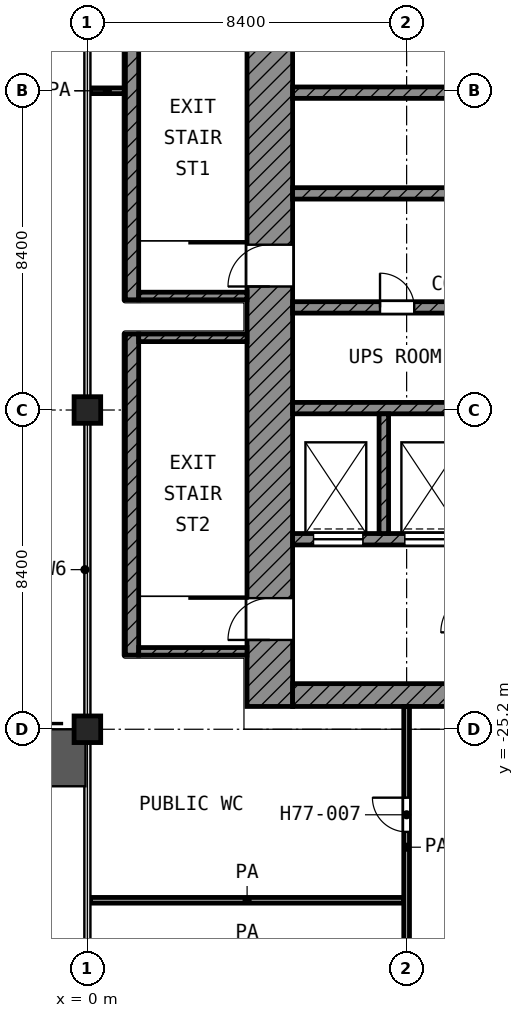
"""IFC4 building model, lengths in metres.
Left out: names, types, materials, properties, quantities, classifications, styles, units other than length and angle.
Written with IfcOpenShell. Run it as: python <this file> out.ifc"""

import sys

from ifc_helpers import new_model, si_unit, direction, frame, frame_2d, origin, origin_2d, place, context, subcontext, project, spatial, rectangle, extrude, element, fill, save


model = new_model("IFC4")
c1 = context("Model", 3, precision=1e-05, world=origin(), true_north=direction((0.0, 1.0)))
c2 = subcontext(c1, "Body", "Model", "MODEL_VIEW")
j1 = project(units=[si_unit("LENGTHUNIT", "METRE"), si_unit("PLANEANGLEUNIT", "RADIAN")], contexts=[c1])
p1 = place(None, origin())
s1 = spatial("IfcSite", under=j1, at=p1, CompositionType="ELEMENT")
p2 = place(p1, origin())
s2 = spatial("IfcBuilding", under=s1, at=p2, CompositionType="ELEMENT")
p3 = place(p2, frame((0.0, 0.0, 332.2)))
s3 = spatial("IfcBuildingStorey", under=s2, at=p3, CompositionType="ELEMENT", Elevation=332.2)
for number, where, z_axis, x_axis in (
    (1, (0.0, -16.8, 0.0), (0.0, 0.0, 1.0), (1.0, 0.0, 0.0)),
    (2, (0.0, -25.2, 0.0), (0.0, 0.0, 1.0), (1.0, 0.0, 0.0)),
):
    element("IfcColumn", number, at=place(p3, frame(where, z_axis=z_axis, x_axis=x_axis)), inside=s3, PredefinedType="COLUMN", context=c2, shape_type="SweptSolid", body=[
        extrude(rectangle(XDim=0.7, YDim=0.7, at=origin_2d()), origin(), (0.0, 0.0, 1.0), 4.5),
    ])
p4 = place(p3, frame((0.125, -30.827, 4.5), z_axis=(0.0, 0.0, 1.0), x_axis=(0.0, 1.0, 0.0)))
e3 = element("IfcWall", 3, at=p4, inside=s3, PredefinedType="SOLIDWALL", context=c2, shape_type="SweptSolid", body=[
    extrude(rectangle(XDim=5.452, YDim=0.25, at=frame_2d((2.726, 0.0))), origin(), (0.0, 0.0, 1.0), 1.1),
])
p5 = place(p3, frame((-0.132, -25.05, 4.5), z_axis=(0.0, 0.0, 1.0), x_axis=(-1.0, 0.0, 0.0)))
e4 = element("IfcWall", 4, at=p5, inside=s3, PredefinedType="SOLIDWALL", context=c2, shape_type="SweptSolid", body=[
    extrude(rectangle(XDim=0.551, YDim=0.25, at=frame_2d((0.275, 0.0))), origin(), (0.0, 0.0, 1.0), 1.1),
])
p6 = place(p3, frame((4.8, -24.6, 0.0), z_axis=(0.0, 0.0, 1.0), x_axis=(0.0, 1.0, 0.0)))
e5 = element("IfcWall", 5, at=p6, inside=s3, PredefinedType="SHEAR", context=c2, shape_type="SweptSolid", body=[
    extrude(rectangle(XDim=19.2, YDim=1.2, at=frame_2d((9.6, 0.0))), origin(), (0.0, 0.0, 1.0), 3.95),
])
p7 = place(p6, frame((11.05, 0.0, 0.0)))
e6 = element("IfcOpeningElement", 6, at=p7, cuts=e5, PredefinedType="OPENING", context=c2, shape_type="SweptSolid", body=[
    extrude(rectangle(XDim=1.1, YDim=2.1, at=frame_2d((0.55, 1.05))), frame((0.0, 0.61, 0.0), z_axis=(0.0, -1.0, 0.0), x_axis=(1.0, 0.0, 0.0)), (0.0, 0.0, 1.0), 1.22),
])
p8 = place(p6, frame((1.75, 0.0, 0.0)))
e7 = element("IfcOpeningElement", 7, at=p8, cuts=e5, PredefinedType="OPENING", context=c2, shape_type="SweptSolid", body=[
    extrude(rectangle(XDim=1.1, YDim=2.1, at=frame_2d((0.55, 1.05))), frame((0.0, 0.61, 0.0), z_axis=(0.0, -1.0, 0.0), x_axis=(1.0, 0.0, 0.0)), (0.0, 0.0, 1.0), 1.22),
])
p9 = place(p3, frame((5.4, -24.3, 0.0), z_axis=(0.0, 0.0, 1.0), x_axis=(1.0, 0.0, 0.0)))
e8 = element("IfcWall", 8, at=p9, inside=s3, PredefinedType="SHEAR", context=c2, shape_type="SweptSolid", body=[
    extrude(rectangle(XDim=18.6, YDim=0.6, at=frame_2d((9.3, 0.0))), origin(), (0.0, 0.0, 1.0), 3.95),
])
p10 = place(p9, frame((6.3, 0.0, 0.0)))
e9 = element("IfcOpeningElement", 9, at=p10, cuts=e8, PredefinedType="OPENING", context=c2, shape_type="SweptSolid", body=[
    extrude(rectangle(XDim=1.8, YDim=2.1, at=frame_2d((0.9, 1.05))), frame((0.0, 0.31, 0.0), z_axis=(0.0, -1.0, 0.0), x_axis=(1.0, 0.0, 0.0)), (0.0, 0.0, 1.0), 0.62),
])
p11 = place(p3, frame((5.4, -8.45, 0.0), z_axis=(0.0, 0.0, 1.0), x_axis=(1.0, 0.0, 0.0)))
e10 = element("IfcWall", 10, at=p11, inside=s3, PredefinedType="SHEAR", context=c2, shape_type="SweptSolid", body=[
    extrude(rectangle(XDim=16.65, YDim=0.3, at=frame_2d((8.325, 0.0))), origin(), (0.0, 0.0, 1.0), 3.95),
])
p12 = place(p3, frame((5.4, -11.1, 0.0), z_axis=(0.0, 0.0, 1.0), x_axis=(1.0, 0.0, 0.0)))
e11 = element("IfcWall", 11, at=p12, inside=s3, PredefinedType="SHEAR", context=c2, shape_type="SweptSolid", body=[
    extrude(rectangle(XDim=16.65, YDim=0.3, at=frame_2d((8.325, 0.0))), origin(), (0.0, 0.0, 1.0), 3.95),
])
p13 = place(p12, frame((7.8, 0.0, 0.0)))
e12 = element("IfcOpeningElement", 12, at=p13, cuts=e11, PredefinedType="OPENING", context=c2, shape_type="SweptSolid", body=[
    extrude(rectangle(XDim=0.9, YDim=2.1, at=frame_2d((0.45, 1.05))), frame((0.0, 0.16, 0.0), z_axis=(0.0, -1.0, 0.0), x_axis=(1.0, 0.0, 0.0)), (0.0, 0.0, 1.0), 0.32),
])
p14 = place(p3, frame((5.4, -14.1, 0.0), z_axis=(0.0, 0.0, 1.0), x_axis=(1.0, 0.0, 0.0)))
e13 = element("IfcWall", 13, at=p14, inside=s3, PredefinedType="SHEAR", context=c2, shape_type="SweptSolid", body=[
    extrude(rectangle(XDim=16.65, YDim=0.3, at=frame_2d((8.325, 0.0))), origin(), (0.0, 0.0, 1.0), 3.95),
])
p15 = place(p14, frame((6.325, 0.0, 0.0)))
e14 = element("IfcOpeningElement", 14, at=p15, cuts=e13, PredefinedType="OPENING", context=c2, shape_type="SweptSolid", body=[
    extrude(rectangle(XDim=1.1, YDim=2.1, at=frame_2d((0.55, 1.05))), frame((0.0, 0.16, 0.0), z_axis=(0.0, -1.0, 0.0), x_axis=(1.0, 0.0, 0.0)), (0.0, 0.0, 1.0), 0.32),
])
p16 = place(p14, frame((9.075, 0.0, 0.0)))
e15 = element("IfcOpeningElement", 15, at=p16, cuts=e13, PredefinedType="OPENING", context=c2, shape_type="SweptSolid", body=[
    extrude(rectangle(XDim=1.1, YDim=2.1, at=frame_2d((0.55, 1.05))), frame((0.0, 0.16, 0.0), z_axis=(0.0, -1.0, 0.0), x_axis=(1.0, 0.0, 0.0)), (0.0, 0.0, 1.0), 0.32),
])
p17 = place(p14, frame((11.825, 0.0, 0.0)))
e16 = element("IfcOpeningElement", 16, at=p17, cuts=e13, PredefinedType="OPENING", context=c2, shape_type="SweptSolid", body=[
    extrude(rectangle(XDim=1.1, YDim=2.1, at=frame_2d((0.55, 1.05))), frame((0.0, 0.16, 0.0), z_axis=(0.0, -1.0, 0.0), x_axis=(1.0, 0.0, 0.0)), (0.0, 0.0, 1.0), 0.32),
])
p18 = place(p14, frame((14.575, 0.0, 0.0)))
e17 = element("IfcOpeningElement", 17, at=p18, cuts=e13, PredefinedType="OPENING", context=c2, shape_type="SweptSolid", body=[
    extrude(rectangle(XDim=1.1, YDim=2.1, at=frame_2d((0.55, 1.05))), frame((0.0, 0.16, 0.0), z_axis=(0.0, -1.0, 0.0), x_axis=(1.0, 0.0, 0.0)), (0.0, 0.0, 1.0), 0.32),
])
p19 = place(p14, frame((2.3, 0.0, 0.0)))
e18 = element("IfcOpeningElement", 18, at=p19, cuts=e13, PredefinedType="OPENING", context=c2, shape_type="SweptSolid", body=[
    extrude(rectangle(XDim=0.9, YDim=2.1, at=frame_2d((0.45, 1.05))), frame((0.0, 0.16, 0.0), z_axis=(0.0, -1.0, 0.0), x_axis=(1.0, 0.0, 0.0)), (0.0, 0.0, 1.0), 0.32),
])
p20 = place(p3, frame((5.4, -16.75, 0.0), z_axis=(0.0, 0.0, 1.0), x_axis=(1.0, 0.0, 0.0)))
e19 = element("IfcWall", 19, at=p20, inside=s3, PredefinedType="SHEAR", context=c2, shape_type="SweptSolid", body=[
    extrude(rectangle(XDim=16.65, YDim=0.3, at=frame_2d((8.325, 0.0))), origin(), (0.0, 0.0, 1.0), 3.95),
])
p21 = place(p3, frame((5.4, -20.2, 0.0), z_axis=(0.0, 0.0, 1.0), x_axis=(1.0, 0.0, 0.0)))
e20 = element("IfcWall", 20, at=p21, inside=s3, PredefinedType="SHEAR", context=c2, shape_type="SweptSolid", body=[
    extrude(rectangle(XDim=14.65, YDim=0.3, at=frame_2d((7.325, 0.0))), origin(), (0.0, 0.0, 1.0), 3.95),
])
p22 = place(p21, frame((10.55, 0.0, 0.0)))
e21 = element("IfcOpeningElement", 21, at=p22, cuts=e20, PredefinedType="OPENING", context=c2, shape_type="SweptSolid", body=[
    extrude(rectangle(XDim=1.3, YDim=2.1, at=frame_2d((0.65, 1.05))), frame((0.0, 0.16, 0.0), z_axis=(0.0, -1.0, 0.0), x_axis=(1.0, 0.0, 0.0)), (0.0, 0.0, 1.0), 0.32),
])
p23 = place(p21, frame((12.95, 0.0, 0.0)))
e22 = element("IfcOpeningElement", 22, at=p23, cuts=e20, PredefinedType="OPENING", context=c2, shape_type="SweptSolid", body=[
    extrude(rectangle(XDim=1.3, YDim=2.1, at=frame_2d((0.65, 1.05))), frame((0.0, 0.16, 0.0), z_axis=(0.0, -1.0, 0.0), x_axis=(1.0, 0.0, 0.0)), (0.0, 0.0, 1.0), 0.32),
])
p24 = place(p21, frame((0.55, 0.0, 0.0)))
e23 = element("IfcOpeningElement", 23, at=p24, cuts=e20, PredefinedType="OPENING", context=c2, shape_type="SweptSolid", body=[
    extrude(rectangle(XDim=1.3, YDim=2.1, at=frame_2d((0.65, 1.05))), frame((0.0, 0.16, 0.0), z_axis=(0.0, -1.0, 0.0), x_axis=(1.0, 0.0, 0.0)), (0.0, 0.0, 1.0), 0.32),
])
p25 = place(p21, frame((2.95, 0.0, 0.0)))
e24 = element("IfcOpeningElement", 24, at=p25, cuts=e20, PredefinedType="OPENING", context=c2, shape_type="SweptSolid", body=[
    extrude(rectangle(XDim=1.3, YDim=2.1, at=frame_2d((0.65, 1.05))), frame((0.0, 0.16, 0.0), z_axis=(0.0, -1.0, 0.0), x_axis=(1.0, 0.0, 0.0)), (0.0, 0.0, 1.0), 0.32),
])
p26 = place(p21, frame((7.15, 0.0, 0.0)))
e25 = element("IfcOpeningElement", 25, at=p26, cuts=e20, PredefinedType="OPENING", context=c2, shape_type="SweptSolid", body=[
    extrude(rectangle(XDim=0.9, YDim=2.1, at=frame_2d((0.45, 1.05))), frame((0.0, 0.16, 0.0), z_axis=(0.0, -1.0, 0.0), x_axis=(1.0, 0.0, 0.0)), (0.0, 0.0, 1.0), 0.32),
])
p27 = place(p3, frame((7.8, -20.05, 0.0), z_axis=(0.0, 0.0, 1.0), x_axis=(0.0, 1.0, 0.0)))
e26 = element("IfcWall", 26, at=p27, inside=s3, PredefinedType="SHEAR", context=c2, shape_type="SweptSolid", body=[
    extrude(rectangle(XDim=3.15, YDim=0.25, at=frame_2d((1.575, 0.0))), origin(), (0.0, 0.0, 1.0), 3.95),
])
p28 = place(p3, frame((1.175, -13.9, 0.0), z_axis=(0.0, 0.0, 1.0), x_axis=(0.0, 1.0, 0.0)))
e27 = element("IfcWall", 27, at=p28, inside=s3, PredefinedType="SHEAR", context=c2, shape_type="SweptSolid", body=[
    extrude(rectangle(XDim=8.45, YDim=0.35, at=frame_2d((4.225, 0.0))), origin(), (0.0, 0.0, 1.0), 3.95),
])
p29 = place(p3, frame((1.35, -13.8, 0.0), z_axis=(0.0, 0.0, 1.0), x_axis=(1.0, 0.0, 0.0)))
e28 = element("IfcWall", 28, at=p29, inside=s3, PredefinedType="SHEAR", context=c2, shape_type="SweptSolid", body=[
    extrude(rectangle(XDim=2.85, YDim=0.2, at=frame_2d((1.425, 0.0))), origin(), (0.0, 0.0, 1.0), 3.95),
])
p30 = place(p3, frame((1.175, -23.25, 0.0), z_axis=(0.0, 0.0, 1.0), x_axis=(0.0, 1.0, 0.0)))
e29 = element("IfcWall", 29, at=p30, inside=s3, PredefinedType="SHEAR", context=c2, shape_type="SweptSolid", body=[
    extrude(rectangle(XDim=8.45, YDim=0.35, at=frame_2d((4.225, 0.0))), origin(), (0.0, 0.0, 1.0), 3.95),
])
for number, where, z_axis, x_axis in (
    (30, (1.35, -14.9, 0.0), (0.0, 0.0, 1.0), (1.0, 0.0, 0.0)),
    (31, (1.35, -23.15, 0.0), (0.0, 0.0, 1.0), (1.0, 0.0, 0.0)),
):
    element("IfcWall", number, at=place(p3, frame(where, z_axis=z_axis, x_axis=x_axis)), inside=s3, PredefinedType="SHEAR", context=c2, shape_type="SweptSolid", body=[
        extrude(rectangle(XDim=2.85, YDim=0.2, at=frame_2d((1.425, 0.0))), origin(), (0.0, 0.0, 1.0), 3.95),
    ])
p31 = place(p3, frame((0.08, -29.7, 0.0), z_axis=(0.0, 0.0, 1.0), x_axis=(1.0, 0.0, 0.0)))
e32 = element("IfcWall", 32, at=p31, inside=s3, PredefinedType="PARTITIONING", context=c2, shape_type="SweptSolid", body=[
    extrude(rectangle(XDim=8.245, YDim=0.15, at=frame_2d((4.123, 0.0))), origin(), (0.0, 0.0, 1.0), 3.95),
])
p32 = place(p3, frame((0.08, -8.4, 0.0), z_axis=(0.0, 0.0, 1.0), x_axis=(1.0, 0.0, 0.0)))
e33 = element("IfcWall", 33, at=p32, inside=s3, PredefinedType="PARTITIONING", context=c2, shape_type="SweptSolid", body=[
    extrude(rectangle(XDim=0.89, YDim=0.15, at=frame_2d((0.445, 0.0))), origin(), (0.0, 0.0, 1.0), 3.95),
])
p33 = place(p3, frame((8.4, -32.007, 0.0), z_axis=(0.0, 0.0, 1.0), x_axis=(0.0, 1.0, 0.0)))
e34 = element("IfcWall", 34, at=p33, inside=s3, PredefinedType="PARTITIONING", context=c2, shape_type="SweptSolid", body=[
    extrude(rectangle(XDim=7.407, YDim=0.15, at=frame_2d((3.704, 0.0))), origin(), (0.0, 0.0, 1.0), 3.95),
])
p34 = place(p33, frame((4.107, 0.0, 0.0)))
e35 = element("IfcOpeningElement", 35, at=p34, cuts=e34, PredefinedType="OPENING", context=c2, shape_type="SweptSolid", body=[
    extrude(rectangle(XDim=0.9, YDim=2.1, at=frame_2d((0.45, 1.05))), frame((0.0, 0.085, 0.0), z_axis=(0.0, -1.0, 0.0), x_axis=(1.0, 0.0, 0.0)), (0.0, 0.0, 1.0), 0.17),
])
p35 = place(p24, origin())
e36 = element("IfcDoor", 36, at=p35, inside=s3, OperationType="DOUBLE_DOOR_SLIDING", PredefinedType="DOOR", context=c2, shape_type="SweptSolid", body=[
    extrude(rectangle(XDim=1.3, YDim=2.1, at=frame_2d((0.65, 1.05))), frame((0.0, 0.025, 0.0), z_axis=(0.0, -1.0, 0.0), x_axis=(1.0, 0.0, 0.0)), (0.0, 0.0, 1.0), 0.05),
])
fill(e23, e36)
p36 = place(p25, origin())
e37 = element("IfcDoor", 37, at=p36, inside=s3, OperationType="DOUBLE_DOOR_SLIDING", PredefinedType="DOOR", context=c2, shape_type="SweptSolid", body=[
    extrude(rectangle(XDim=1.3, YDim=2.1, at=frame_2d((0.65, 1.05))), frame((0.0, 0.025, 0.0), z_axis=(0.0, -1.0, 0.0), x_axis=(1.0, 0.0, 0.0)), (0.0, 0.0, 1.0), 0.05),
])
fill(e24, e37)
p37 = place(p7, origin())
e38 = element("IfcDoor", 38, at=p37, inside=s3, OperationType="SINGLE_SWING_LEFT", PredefinedType="DOOR", context=c2, shape_type="SweptSolid", body=[
    extrude(rectangle(XDim=1.1, YDim=2.1, at=frame_2d((0.55, 1.05))), frame((0.0, 0.025, 0.0), z_axis=(0.0, -1.0, 0.0), x_axis=(1.0, 0.0, 0.0)), (0.0, 0.0, 1.0), 0.05),
])
fill(e6, e38)
p38 = place(p8, origin())
e39 = element("IfcDoor", 39, at=p38, inside=s3, OperationType="SINGLE_SWING_LEFT", PredefinedType="DOOR", context=c2, shape_type="SweptSolid", body=[
    extrude(rectangle(XDim=1.1, YDim=2.1, at=frame_2d((0.55, 1.05))), frame((0.0, 0.025, 0.0), z_axis=(0.0, -1.0, 0.0), x_axis=(1.0, 0.0, 0.0)), (0.0, 0.0, 1.0), 0.05),
])
fill(e7, e39)
p39 = place(p19, origin())
e40 = element("IfcDoor", 40, at=p39, inside=s3, OperationType="SINGLE_SWING_LEFT", PredefinedType="DOOR", context=c2, shape_type="SweptSolid", body=[
    extrude(rectangle(XDim=0.9, YDim=2.1, at=frame_2d((0.45, 1.05))), frame((0.0, 0.025, 0.0), z_axis=(0.0, -1.0, 0.0), x_axis=(1.0, 0.0, 0.0)), (0.0, 0.0, 1.0), 0.05),
])
fill(e18, e40)
p40 = place(p34, origin())
e41 = element("IfcDoor", 41, at=p40, inside=s3, OperationType="SINGLE_SWING_RIGHT", PredefinedType="DOOR", context=c2, shape_type="SweptSolid", body=[
    extrude(rectangle(XDim=0.9, YDim=2.1, at=frame_2d((0.45, 1.05))), frame((0.0, 0.025, 0.0), z_axis=(0.0, -1.0, 0.0), x_axis=(1.0, 0.0, 0.0)), (0.0, 0.0, 1.0), 0.05),
])
fill(e35, e41)
save(model, sys.argv[1])
